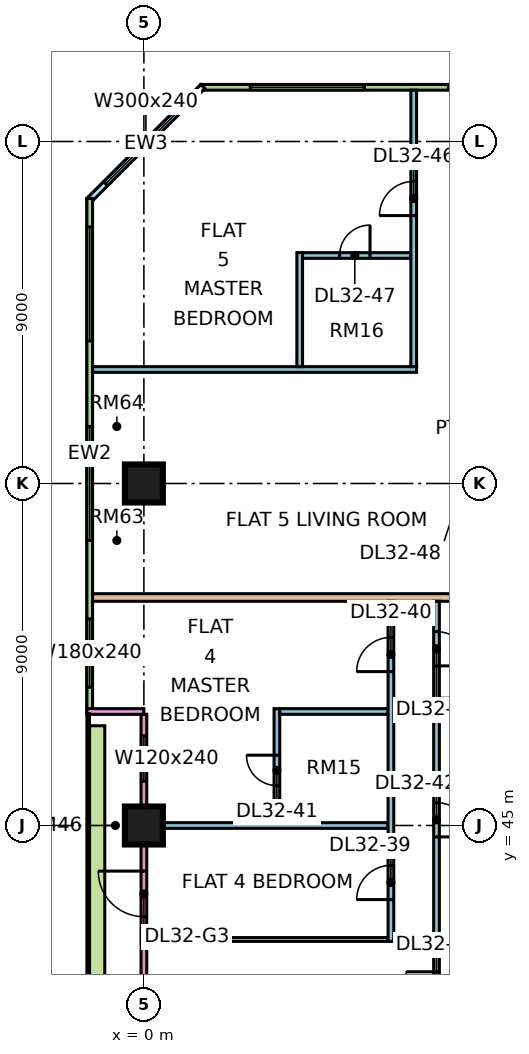
"""IFC4 building model, lengths in metres.
Left out: names, types, materials, properties, quantities, classifications, styles, units other than length and angle.
Written with IfcOpenShell. Run it as: python <this file> out.ifc"""

import sys

from ifc_helpers import new_model, si_unit, direction, frame, frame_2d, origin, origin_2d, place, context, subcontext, project, spatial, rectangle, extrude, element, fill, save


model = new_model("IFC4")
c1 = context("Model", 3, precision=1e-05, world=origin(), true_north=direction((0.0, 1.0)))
c2 = subcontext(c1, "Body", "Model", "MODEL_VIEW")
j1 = project(units=[si_unit("LENGTHUNIT", "METRE"), si_unit("PLANEANGLEUNIT", "RADIAN")], contexts=[c1])
p1 = place(None, origin())
s1 = spatial("IfcSite", under=j1, at=p1, CompositionType="ELEMENT")
p2 = place(p1, origin())
s2 = spatial("IfcBuilding", under=s1, at=p2, CompositionType="ELEMENT")
p3 = place(p2, frame((0.0, 0.0, 136.9)))
s3 = spatial("IfcBuildingStorey", under=s2, at=p3, CompositionType="ELEMENT", Elevation=136.9)
for number, where, z_axis, x_axis in (
    (1, (0.0, 45.0, 0.0), (0.0, 0.0, 1.0), (1.0, 0.0, 0.0)),
    (2, (0.0, 54.0, 0.0), (0.0, 0.0, 1.0), (1.0, 0.0, 0.0)),
):
    element("IfcColumn", number, at=place(p3, frame(where, z_axis=z_axis, x_axis=x_axis)), inside=s3, PredefinedType="COLUMN", context=c2, shape_type="SweptSolid", body=[
        extrude(rectangle(XDim=1.0, YDim=1.0, at=origin_2d()), origin(), (0.0, 0.0, 1.0), 3.75),
    ])
p4 = place(p3, frame((11.925, 64.425, 0.0), z_axis=(0.0, 0.0, 1.0), x_axis=(-1.0, 0.0, 0.0)))
e3 = element("IfcWall", 3, at=p4, inside=s3, PredefinedType="SOLIDWALL", context=c2, shape_type="SweptSolid", body=[
    extrude(rectangle(XDim=10.425, YDim=0.15, at=frame_2d((5.212, 0.0))), origin(), (0.0, 0.0, 1.0), 3.3),
])
p5 = place(p4, frame((0.913, 0.0, 0.45)))
e4 = element("IfcOpeningElement", 4, at=p5, cuts=e3, PredefinedType="OPENING", context=c2, shape_type="SweptSolid", body=[
    extrude(rectangle(XDim=3.0, YDim=2.4, at=frame_2d((1.5, 1.2))), frame((0.0, 0.085, 0.0), z_axis=(0.0, -1.0, 0.0), x_axis=(1.0, 0.0, 0.0)), (0.0, 0.0, 1.0), 0.17),
])
p6 = place(p4, frame((6.125, 0.0, 0.45)))
e5 = element("IfcOpeningElement", 5, at=p6, cuts=e3, PredefinedType="OPENING", context=c2, shape_type="SweptSolid", body=[
    extrude(rectangle(XDim=3.0, YDim=2.4, at=frame_2d((1.5, 1.2))), frame((0.0, 0.085, 0.0), z_axis=(0.0, -1.0, 0.0), x_axis=(1.0, 0.0, 0.0)), (0.0, 0.0, 1.0), 0.17),
])
p7 = place(p3, frame((1.553, 64.447, 0.0), z_axis=(0.0, 0.0, 1.0), x_axis=(-0.707106781187, -0.707106781187, 0.0)))
e6 = element("IfcWall", 6, at=p7, inside=s3, PredefinedType="SOLIDWALL", context=c2, shape_type="SweptSolid", body=[
    extrude(rectangle(XDim=4.243, YDim=0.15, at=frame_2d((2.121, 0.0))), origin(), (0.0, 0.0, 1.0), 3.3),
])
p8 = place(p7, frame((0.621, 0.0, 0.45)))
e7 = element("IfcOpeningElement", 7, at=p8, cuts=e6, PredefinedType="OPENING", context=c2, shape_type="SweptSolid", body=[
    extrude(rectangle(XDim=3.0, YDim=2.4, at=frame_2d((1.5, 1.2))), frame((0.0, 0.085, 0.0), z_axis=(0.0, -1.0, 0.0), x_axis=(1.0, 0.0, 0.0)), (0.0, 0.0, 1.0), 0.17),
])
p9 = place(p3, frame((-1.425, 61.5, 0.0), z_axis=(0.0, 0.0, 1.0), x_axis=(0.0, -1.0, 0.0)))
e8 = element("IfcWall", 8, at=p9, inside=s3, PredefinedType="SOLIDWALL", context=c2, shape_type="SweptSolid", body=[
    extrude(rectangle(XDim=13.425, YDim=0.15, at=frame_2d((6.712, 0.0))), origin(), (0.0, 0.0, 1.0), 3.3),
])
p10 = place(p9, frame((0.75, 0.0, 0.45)))
e9 = element("IfcOpeningElement", 9, at=p10, cuts=e8, PredefinedType="OPENING", context=c2, shape_type="SweptSolid", body=[
    extrude(rectangle(XDim=3.0, YDim=2.4, at=frame_2d((1.5, 1.2))), frame((0.0, 0.085, 0.0), z_axis=(0.0, -1.0, 0.0), x_axis=(1.0, 0.0, 0.0)), (0.0, 0.0, 1.0), 0.17),
])
p11 = place(p9, frame((6.0, 0.0, 0.45)))
e10 = element("IfcOpeningElement", 10, at=p11, cuts=e8, PredefinedType="OPENING", context=c2, shape_type="SweptSolid", body=[
    extrude(rectangle(XDim=3.0, YDim=2.4, at=frame_2d((1.5, 1.2))), frame((0.0, 0.085, 0.0), z_axis=(0.0, -1.0, 0.0), x_axis=(1.0, 0.0, 0.0)), (0.0, 0.0, 1.0), 0.17),
])
p12 = place(p9, frame((11.062, 0.0, 0.45)))
e11 = element("IfcOpeningElement", 11, at=p12, cuts=e8, PredefinedType="OPENING", context=c2, shape_type="SweptSolid", body=[
    extrude(rectangle(XDim=1.8, YDim=2.4, at=frame_2d((0.9, 1.2))), frame((0.0, 0.085, 0.0), z_axis=(0.0, -1.0, 0.0), x_axis=(1.0, 0.0, 0.0)), (0.0, 0.0, 1.0), 0.17),
])
p13 = place(p3, frame((0.0, 47.925, 0.0), z_axis=(0.0, 0.0, 1.0), x_axis=(0.0, -1.0, 0.0)))
e12 = element("IfcWall", 12, at=p13, inside=s3, PredefinedType="SOLIDWALL", context=c2, shape_type="SweptSolid", body=[
    extrude(rectangle(XDim=11.85, YDim=0.15, at=frame_2d((5.925, 0.0))), origin(), (0.0, 0.0, 1.0), 3.3),
])
p14 = place(p13, frame((0.562, 0.0, 0.45)))
e13 = element("IfcOpeningElement", 13, at=p14, cuts=e12, PredefinedType="OPENING", context=c2, shape_type="SweptSolid", body=[
    extrude(rectangle(XDim=1.2, YDim=2.4, at=frame_2d((0.6, 1.2))), frame((0.0, 0.085, 0.0), z_axis=(0.0, -1.0, 0.0), x_axis=(1.0, 0.0, 0.0)), (0.0, 0.0, 1.0), 0.17),
])
p15 = place(p13, frame((4.125, 0.0, 0.0)))
e14 = element("IfcOpeningElement", 14, at=p15, cuts=e12, PredefinedType="OPENING", context=c2, shape_type="SweptSolid", body=[
    extrude(rectangle(XDim=1.2, YDim=2.4, at=frame_2d((0.6, 1.2))), frame((0.0, 0.085, 0.0), z_axis=(0.0, -1.0, 0.0), x_axis=(1.0, 0.0, 0.0)), (0.0, 0.0, 1.0), 0.17),
])
p16 = place(p13, frame((7.125, 0.0, 0.45)))
e15 = element("IfcOpeningElement", 15, at=p16, cuts=e12, PredefinedType="OPENING", context=c2, shape_type="SweptSolid", body=[
    extrude(rectangle(XDim=3.0, YDim=2.4, at=frame_2d((1.5, 1.2))), frame((0.0, 0.085, 0.0), z_axis=(0.0, -1.0, 0.0), x_axis=(1.0, 0.0, 0.0)), (0.0, 0.0, 1.0), 0.17),
])
p17 = place(p3, frame((-1.5, 48.0, 0.0), z_axis=(0.0, 0.0, 1.0), x_axis=(1.0, 0.0, 0.0)))
e16 = element("IfcWall", 16, at=p17, inside=s3, PredefinedType="SOLIDWALL", context=c2, shape_type="SweptSolid", body=[
    extrude(rectangle(XDim=1.5, YDim=0.15, at=frame_2d((0.75, 0.0))), origin(), (0.0, 0.0, 1.0), 3.3),
])
p18 = place(p3, frame((-1.229, 47.625, 0.0), z_axis=(0.0, 0.0, 1.0), x_axis=(0.0, -1.0, 0.0)))
e17 = element("IfcWall", 17, at=p18, inside=s3, PredefinedType="SOLIDWALL", context=c2, shape_type="SweptSolid", body=[
    extrude(rectangle(XDim=11.25, YDim=0.4, at=frame_2d((5.625, 0.0))), origin(), (0.0, 0.0, 1.0), 0.7),
])
p19 = place(p3, frame((-1.35, 51.0, 0.0), z_axis=(0.0, 0.0, 1.0), x_axis=(1.0, 0.0, 0.0)))
e18 = element("IfcWall", 18, at=p19, inside=s3, PredefinedType="PARTITIONING", context=c2, shape_type="SweptSolid", body=[
    extrude(rectangle(XDim=13.75, YDim=0.2, at=frame_2d((6.875, 0.0))), origin(), (0.0, 0.0, 1.0), 3.3),
])
p20 = place(p3, frame((-1.35, 57.0, 0.0), z_axis=(0.0, 0.0, 1.0), x_axis=(1.0, 0.0, 0.0)))
e19 = element("IfcWall", 19, at=p20, inside=s3, PredefinedType="PARTITIONING", context=c2, shape_type="SweptSolid", body=[
    extrude(rectangle(XDim=8.525, YDim=0.15, at=frame_2d((4.263, 0.0))), origin(), (0.0, 0.0, 1.0), 3.3),
])
p21 = place(p3, frame((0.074, 42.0, 0.0), z_axis=(0.0, 0.0, 1.0), x_axis=(1.0, 0.0, 0.0)))
e20 = element("IfcWall", 20, at=p21, inside=s3, PredefinedType="PARTITIONING", context=c2, shape_type="SweptSolid", body=[
    extrude(rectangle(XDim=6.351, YDim=0.1, at=frame_2d((3.176, 0.0))), origin(), (0.0, 0.0, 1.0), 3.3),
])
p22 = place(p3, frame((0.074, 45.0, 0.0), z_axis=(0.0, 0.0, 1.0), x_axis=(1.0, 0.0, 0.0)))
e21 = element("IfcWall", 21, at=p22, inside=s3, PredefinedType="PARTITIONING", context=c2, shape_type="SweptSolid", body=[
    extrude(rectangle(XDim=6.351, YDim=0.15, at=frame_2d((3.176, 0.0))), origin(), (0.0, 0.0, 1.0), 3.3),
])
p23 = place(p3, frame((3.5, 45.075, 0.0), z_axis=(0.0, 0.0, 1.0), x_axis=(0.0, 1.0, 0.0)))
e22 = element("IfcWall", 22, at=p23, inside=s3, PredefinedType="PARTITIONING", context=c2, shape_type="SweptSolid", body=[
    extrude(rectangle(XDim=3.0, YDim=0.15, at=frame_2d((1.5, 0.0))), origin(), (0.0, 0.0, 1.0), 3.3),
])
p24 = place(p23, frame((0.975, 0.0, 0.0)))
e23 = element("IfcOpeningElement", 23, at=p24, cuts=e22, PredefinedType="OPENING", context=c2, shape_type="SweptSolid", body=[
    extrude(rectangle(XDim=0.8, YDim=2.1, at=frame_2d((0.4, 1.05))), frame((0.0, 0.085, 0.0), z_axis=(0.0, -1.0, 0.0), x_axis=(1.0, 0.0, 0.0)), (0.0, 0.0, 1.0), 0.17),
])
p25 = place(p3, frame((3.575, 48.0, 0.0), z_axis=(0.0, 0.0, 1.0), x_axis=(1.0, 0.0, 0.0)))
e24 = element("IfcWall", 24, at=p25, inside=s3, PredefinedType="PARTITIONING", context=c2, shape_type="SweptSolid", body=[
    extrude(rectangle(XDim=2.85, YDim=0.15, at=frame_2d((1.425, 0.0))), origin(), (0.0, 0.0, 1.0), 3.3),
])
p26 = place(p3, frame((4.1, 57.075, 0.0), z_axis=(0.0, 0.0, 1.0), x_axis=(0.0, 1.0, 0.0)))
e25 = element("IfcWall", 25, at=p26, inside=s3, PredefinedType="PARTITIONING", context=c2, shape_type="SweptSolid", body=[
    extrude(rectangle(XDim=3.0, YDim=0.15, at=frame_2d((1.5, 0.0))), origin(), (0.0, 0.0, 1.0), 3.3),
])
p27 = place(p3, frame((4.175, 60.0, 0.0), z_axis=(0.0, 0.0, 1.0), x_axis=(1.0, 0.0, 0.0)))
e26 = element("IfcWall", 26, at=p27, inside=s3, PredefinedType="PARTITIONING", context=c2, shape_type="SweptSolid", body=[
    extrude(rectangle(XDim=2.85, YDim=0.15, at=frame_2d((1.425, 0.0))), origin(), (0.0, 0.0, 1.0), 3.3),
])
p28 = place(p27, frame((0.975, 0.0, 0.0)))
e27 = element("IfcOpeningElement", 27, at=p28, cuts=e26, PredefinedType="OPENING", context=c2, shape_type="SweptSolid", body=[
    extrude(rectangle(XDim=0.8, YDim=2.1, at=frame_2d((0.4, 1.05))), frame((0.0, 0.085, 0.0), z_axis=(0.0, -1.0, 0.0), x_axis=(1.0, 0.0, 0.0)), (0.0, 0.0, 1.0), 0.17),
])
p29 = place(p3, frame((6.5, 41.95, 0.0), z_axis=(0.0, 0.0, 1.0), x_axis=(0.0, 1.0, 0.0)))
e28 = element("IfcWall", 28, at=p29, inside=s3, PredefinedType="PARTITIONING", context=c2, shape_type="SweptSolid", body=[
    extrude(rectangle(XDim=8.95, YDim=0.15, at=frame_2d((4.475, 0.0))), origin(), (0.0, 0.0, 1.0), 3.3),
])
p30 = place(p29, frame((1.1, 0.0, 0.0)))
e29 = element("IfcOpeningElement", 29, at=p30, cuts=e28, PredefinedType="OPENING", context=c2, shape_type="SweptSolid", body=[
    extrude(rectangle(XDim=0.9, YDim=2.1, at=frame_2d((0.45, 1.05))), frame((0.0, 0.085, 0.0), z_axis=(0.0, -1.0, 0.0), x_axis=(1.0, 0.0, 0.0)), (0.0, 0.0, 1.0), 0.17),
])
p31 = place(p29, frame((7.1, 0.0, 0.0)))
e30 = element("IfcOpeningElement", 30, at=p31, cuts=e28, PredefinedType="OPENING", context=c2, shape_type="SweptSolid", body=[
    extrude(rectangle(XDim=0.9, YDim=2.1, at=frame_2d((0.45, 1.05))), frame((0.0, 0.085, 0.0), z_axis=(0.0, -1.0, 0.0), x_axis=(1.0, 0.0, 0.0)), (0.0, 0.0, 1.0), 0.17),
])
p32 = place(p3, frame((7.1, 57.075, 0.0), z_axis=(0.0, 0.0, 1.0), x_axis=(0.0, 1.0, 0.0)))
e31 = element("IfcWall", 31, at=p32, inside=s3, PredefinedType="PARTITIONING", context=c2, shape_type="SweptSolid", body=[
    extrude(rectangle(XDim=7.275, YDim=0.15, at=frame_2d((3.638, 0.0))), origin(), (0.0, 0.0, 1.0), 3.3),
])
p33 = place(p32, frame((3.975, 0.0, 0.0)))
e32 = element("IfcOpeningElement", 32, at=p33, cuts=e31, PredefinedType="OPENING", context=c2, shape_type="SweptSolid", body=[
    extrude(rectangle(XDim=0.9, YDim=2.1, at=frame_2d((0.45, 1.05))), frame((0.0, 0.085, 0.0), z_axis=(0.0, -1.0, 0.0), x_axis=(1.0, 0.0, 0.0)), (0.0, 0.0, 1.0), 0.17),
])
p34 = place(p3, frame((7.7, 39.525, 0.0), z_axis=(0.0, 0.0, 1.0), x_axis=(0.0, 1.0, 0.0)))
e33 = element("IfcWall", 33, at=p34, inside=s3, PredefinedType="PARTITIONING", context=c2, shape_type="SweptSolid", body=[
    extrude(rectangle(XDim=11.375, YDim=0.15, at=frame_2d((5.688, 0.0))), origin(), (0.0, 0.0, 1.0), 3.3),
])
p35 = place(p34, frame((0.825, 0.0, 0.0)))
e34 = element("IfcOpeningElement", 34, at=p35, cuts=e33, PredefinedType="OPENING", context=c2, shape_type="SweptSolid", body=[
    extrude(rectangle(XDim=0.8, YDim=2.1, at=frame_2d((0.4, 1.05))), frame((0.0, 0.085, 0.0), z_axis=(0.0, -1.0, 0.0), x_axis=(1.0, 0.0, 0.0)), (0.0, 0.0, 1.0), 0.17),
])
p36 = place(p34, frame((5.175, 0.0, 0.0)))
e35 = element("IfcOpeningElement", 35, at=p36, cuts=e33, PredefinedType="OPENING", context=c2, shape_type="SweptSolid", body=[
    extrude(rectangle(XDim=0.9, YDim=2.1, at=frame_2d((0.45, 1.05))), frame((0.0, 0.085, 0.0), z_axis=(0.0, -1.0, 0.0), x_axis=(1.0, 0.0, 0.0)), (0.0, 0.0, 1.0), 0.17),
])
p37 = place(p34, frame((9.675, 0.0, 0.0)))
e36 = element("IfcOpeningElement", 36, at=p37, cuts=e33, PredefinedType="OPENING", context=c2, shape_type="SweptSolid", body=[
    extrude(rectangle(XDim=0.9, YDim=2.1, at=frame_2d((0.45, 1.05))), frame((0.0, 0.085, 0.0), z_axis=(0.0, -1.0, 0.0), x_axis=(1.0, 0.0, 0.0)), (0.0, 0.0, 1.0), 0.17),
])
p38 = place(p3, frame((7.775, 42.0, 0.0), z_axis=(0.0, 0.0, 1.0), x_axis=(1.0, 0.0, 0.0)))
e37 = element("IfcWall", 37, at=p38, inside=s3, PredefinedType="PARTITIONING", context=c2, shape_type="SweptSolid", body=[
    extrude(rectangle(XDim=4.625, YDim=0.15, at=frame_2d((2.312, 0.0))), origin(), (0.0, 0.0, 1.0), 3.3),
])
p39 = place(p3, frame((7.775, 48.3, 0.0), z_axis=(0.0, 0.0, 1.0), x_axis=(1.0, 0.0, 0.0)))
e38 = element("IfcWall", 38, at=p39, inside=s3, PredefinedType="PARTITIONING", context=c2, shape_type="SweptSolid", body=[
    extrude(rectangle(XDim=4.625, YDim=0.1, at=frame_2d((2.312, 0.0))), origin(), (0.0, 0.0, 1.0), 3.3),
])
p40 = place(p5, origin())
e39 = element("IfcWindow", 39, at=p40, inside=s3, PartitioningType="SINGLE_PANEL", PredefinedType="WINDOW", context=c2, shape_type="SweptSolid", body=[
    extrude(rectangle(XDim=3.0, YDim=2.4, at=frame_2d((1.5, 1.2))), frame((0.0, 0.03, 0.0), z_axis=(0.0, -1.0, 0.0), x_axis=(1.0, 0.0, 0.0)), (0.0, 0.0, 1.0), 0.06),
])
fill(e4, e39)
p41 = place(p6, origin())
e40 = element("IfcWindow", 40, at=p41, inside=s3, PartitioningType="SINGLE_PANEL", PredefinedType="WINDOW", context=c2, shape_type="SweptSolid", body=[
    extrude(rectangle(XDim=3.0, YDim=2.4, at=frame_2d((1.5, 1.2))), frame((0.0, 0.03, 0.0), z_axis=(0.0, -1.0, 0.0), x_axis=(1.0, 0.0, 0.0)), (0.0, 0.0, 1.0), 0.06),
])
fill(e5, e40)
p42 = place(p8, origin())
e41 = element("IfcWindow", 41, at=p42, inside=s3, PartitioningType="SINGLE_PANEL", PredefinedType="WINDOW", context=c2, shape_type="SweptSolid", body=[
    extrude(rectangle(XDim=3.0, YDim=2.4, at=frame_2d((1.5, 1.2))), frame((0.0, 0.03, 0.0), z_axis=(0.0, -1.0, 0.0), x_axis=(1.0, 0.0, 0.0)), (0.0, 0.0, 1.0), 0.06),
])
fill(e7, e41)
p43 = place(p10, origin())
e42 = element("IfcWindow", 42, at=p43, inside=s3, PartitioningType="SINGLE_PANEL", PredefinedType="WINDOW", context=c2, shape_type="SweptSolid", body=[
    extrude(rectangle(XDim=3.0, YDim=2.4, at=frame_2d((1.5, 1.2))), frame((0.0, 0.03, 0.0), z_axis=(0.0, -1.0, 0.0), x_axis=(1.0, 0.0, 0.0)), (0.0, 0.0, 1.0), 0.06),
])
fill(e9, e42)
p44 = place(p11, origin())
e43 = element("IfcWindow", 43, at=p44, inside=s3, PartitioningType="SINGLE_PANEL", PredefinedType="WINDOW", context=c2, shape_type="SweptSolid", body=[
    extrude(rectangle(XDim=3.0, YDim=2.4, at=frame_2d((1.5, 1.2))), frame((0.0, 0.03, 0.0), z_axis=(0.0, -1.0, 0.0), x_axis=(1.0, 0.0, 0.0)), (0.0, 0.0, 1.0), 0.06),
])
fill(e10, e43)
p45 = place(p12, origin())
e44 = element("IfcWindow", 44, at=p45, inside=s3, PartitioningType="SINGLE_PANEL", PredefinedType="WINDOW", context=c2, shape_type="SweptSolid", body=[
    extrude(rectangle(XDim=1.8, YDim=2.4, at=frame_2d((0.9, 1.2))), frame((0.0, 0.03, 0.0), z_axis=(0.0, -1.0, 0.0), x_axis=(1.0, 0.0, 0.0)), (0.0, 0.0, 1.0), 0.06),
])
fill(e11, e44)
p46 = place(p14, origin())
e45 = element("IfcWindow", 45, at=p46, inside=s3, PartitioningType="SINGLE_PANEL", PredefinedType="WINDOW", context=c2, shape_type="SweptSolid", body=[
    extrude(rectangle(XDim=1.2, YDim=2.4, at=frame_2d((0.6, 1.2))), frame((0.0, 0.03, 0.0), z_axis=(0.0, -1.0, 0.0), x_axis=(1.0, 0.0, 0.0)), (0.0, 0.0, 1.0), 0.06),
])
fill(e13, e45)
p47 = place(p15, frame((1.2, 0.0, 0.0), z_axis=(0.0, 0.0, 1.0), x_axis=(-1.0, 0.0, 0.0)))
e46 = element("IfcDoor", 46, at=p47, inside=s3, OperationType="DOUBLE_DOOR_SINGLE_SWING", PredefinedType="DOOR", context=c2, shape_type="SweptSolid", body=[
    extrude(rectangle(XDim=1.2, YDim=2.4, at=frame_2d((0.6, 1.2))), frame((0.0, 0.025, 0.0), z_axis=(0.0, -1.0, 0.0), x_axis=(1.0, 0.0, 0.0)), (0.0, 0.0, 1.0), 0.05),
])
fill(e14, e46)
p48 = place(p35, frame((0.8, 0.0, 0.0), z_axis=(0.0, 0.0, 1.0), x_axis=(-1.0, 0.0, 0.0)))
e47 = element("IfcDoor", 47, at=p48, inside=s3, OperationType="SINGLE_SWING_RIGHT", PredefinedType="DOOR", context=c2, shape_type="SweptSolid", body=[
    extrude(rectangle(XDim=0.8, YDim=2.1, at=frame_2d((0.4, 1.05))), frame((0.0, 0.025, 0.0), z_axis=(0.0, -1.0, 0.0), x_axis=(1.0, 0.0, 0.0)), (0.0, 0.0, 1.0), 0.05),
])
fill(e34, e47)
p49 = place(p30, origin())
e48 = element("IfcDoor", 48, at=p49, inside=s3, OperationType="SINGLE_SWING_LEFT", PredefinedType="DOOR", context=c2, shape_type="SweptSolid", body=[
    extrude(rectangle(XDim=0.9, YDim=2.1, at=frame_2d((0.45, 1.05))), frame((0.0, 0.025, 0.0), z_axis=(0.0, -1.0, 0.0), x_axis=(1.0, 0.0, 0.0)), (0.0, 0.0, 1.0), 0.05),
])
fill(e29, e48)
p50 = place(p31, origin())
e49 = element("IfcDoor", 49, at=p50, inside=s3, OperationType="SINGLE_SWING_LEFT", PredefinedType="DOOR", context=c2, shape_type="SweptSolid", body=[
    extrude(rectangle(XDim=0.9, YDim=2.1, at=frame_2d((0.45, 1.05))), frame((0.0, 0.025, 0.0), z_axis=(0.0, -1.0, 0.0), x_axis=(1.0, 0.0, 0.0)), (0.0, 0.0, 1.0), 0.05),
])
fill(e30, e49)
p51 = place(p24, frame((0.8, 0.0, 0.0), z_axis=(0.0, 0.0, 1.0), x_axis=(-1.0, 0.0, 0.0)))
e50 = element("IfcDoor", 50, at=p51, inside=s3, OperationType="SINGLE_SWING_RIGHT", PredefinedType="DOOR", context=c2, shape_type="SweptSolid", body=[
    extrude(rectangle(XDim=0.8, YDim=2.1, at=frame_2d((0.4, 1.05))), frame((0.0, 0.025, 0.0), z_axis=(0.0, -1.0, 0.0), x_axis=(1.0, 0.0, 0.0)), (0.0, 0.0, 1.0), 0.05),
])
fill(e23, e50)
p52 = place(p36, frame((0.9, 0.0, 0.0), z_axis=(0.0, 0.0, 1.0), x_axis=(-1.0, 0.0, 0.0)))
e51 = element("IfcDoor", 51, at=p52, inside=s3, OperationType="SINGLE_SWING_LEFT", PredefinedType="DOOR", context=c2, shape_type="SweptSolid", body=[
    extrude(rectangle(XDim=0.9, YDim=2.1, at=frame_2d((0.45, 1.05))), frame((0.0, 0.025, 0.0), z_axis=(0.0, -1.0, 0.0), x_axis=(1.0, 0.0, 0.0)), (0.0, 0.0, 1.0), 0.05),
])
fill(e35, e51)
p53 = place(p37, frame((0.9, 0.0, 0.0), z_axis=(0.0, 0.0, 1.0), x_axis=(-1.0, 0.0, 0.0)))
e52 = element("IfcDoor", 52, at=p53, inside=s3, OperationType="SINGLE_SWING_LEFT", PredefinedType="DOOR", context=c2, shape_type="SweptSolid", body=[
    extrude(rectangle(XDim=0.9, YDim=2.1, at=frame_2d((0.45, 1.05))), frame((0.0, 0.025, 0.0), z_axis=(0.0, -1.0, 0.0), x_axis=(1.0, 0.0, 0.0)), (0.0, 0.0, 1.0), 0.05),
])
fill(e36, e52)
p54 = place(p33, origin())
e53 = element("IfcDoor", 53, at=p54, inside=s3, OperationType="SINGLE_SWING_LEFT", PredefinedType="DOOR", context=c2, shape_type="SweptSolid", body=[
    extrude(rectangle(XDim=0.9, YDim=2.1, at=frame_2d((0.45, 1.05))), frame((0.0, 0.025, 0.0), z_axis=(0.0, -1.0, 0.0), x_axis=(1.0, 0.0, 0.0)), (0.0, 0.0, 1.0), 0.05),
])
fill(e32, e53)
p55 = place(p28, frame((0.8, 0.0, 0.0), z_axis=(0.0, 0.0, 1.0), x_axis=(-1.0, 0.0, 0.0)))
e54 = element("IfcDoor", 54, at=p55, inside=s3, OperationType="SINGLE_SWING_RIGHT", PredefinedType="DOOR", context=c2, shape_type="SweptSolid", body=[
    extrude(rectangle(XDim=0.8, YDim=2.1, at=frame_2d((0.4, 1.05))), frame((0.0, 0.025, 0.0), z_axis=(0.0, -1.0, 0.0), x_axis=(1.0, 0.0, 0.0)), (0.0, 0.0, 1.0), 0.05),
])
fill(e27, e54)
save(model, sys.argv[1])
